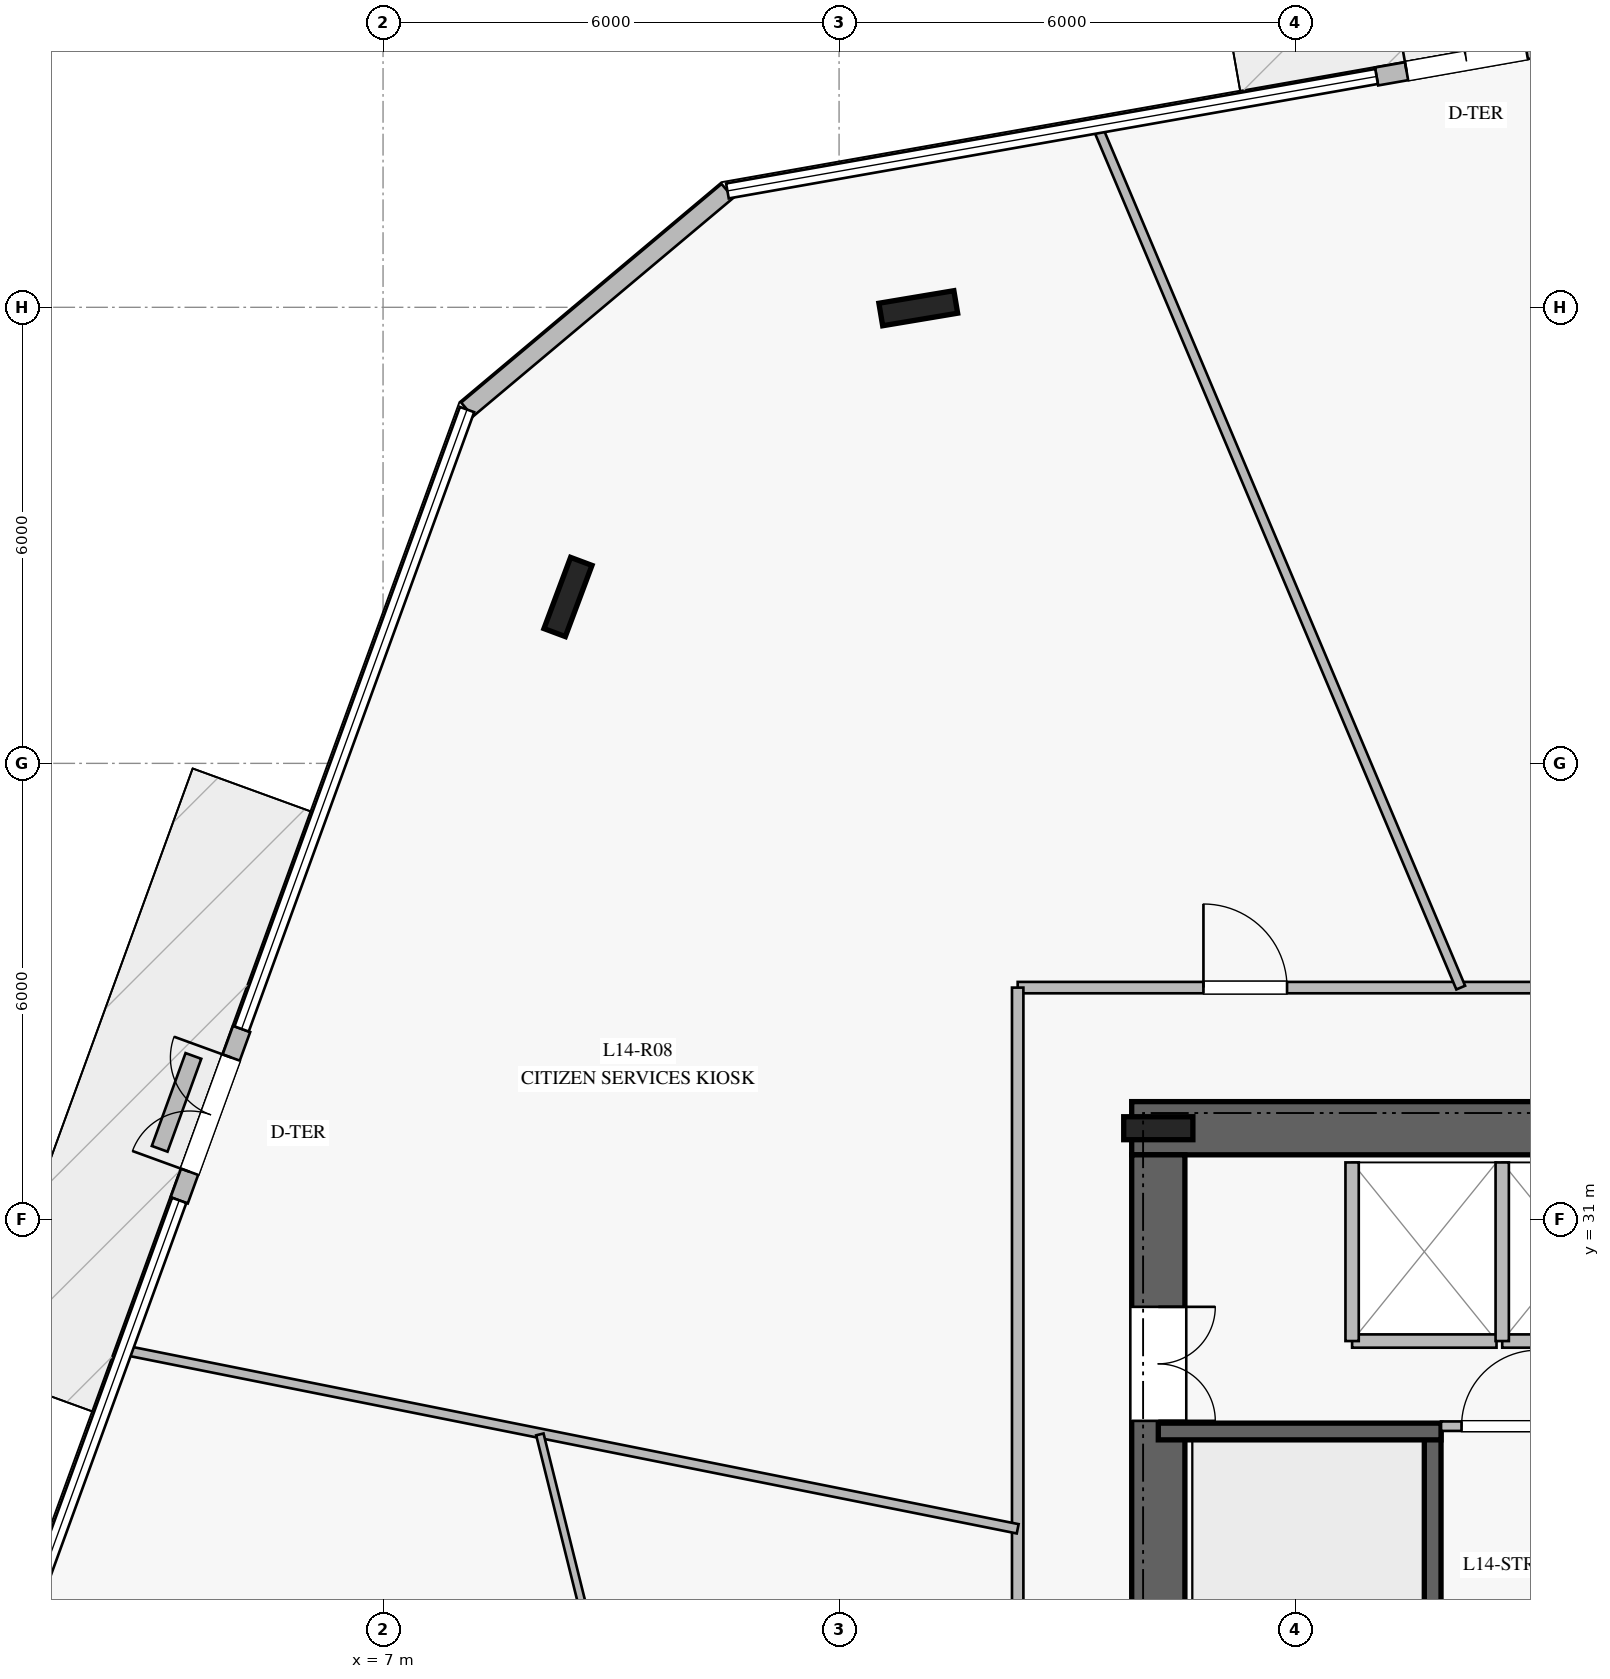
"""IFC4 building model, lengths in metres.
Left out: names, types, materials, properties, quantities, classifications, styles, units other than length and angle.
Written with IfcOpenShell. Run it as: python <this file> out.ifc"""

import sys

from ifc_helpers import new_model, si_unit, direction, frame, frame_2d, origin, origin_2d, place, context, subcontext, project, spatial, rectangle, i_section, extrude, element, fill, save


model = new_model("IFC4")
c1 = context("Model", 3, precision=1e-05, world=origin(), true_north=direction((0.0, 1.0)))
c2 = subcontext(c1, "Body", "Model", "MODEL_VIEW")
j1 = project(units=[si_unit("LENGTHUNIT", "METRE"), si_unit("PLANEANGLEUNIT", "RADIAN")], contexts=[c1])
p1 = place(None, origin())
s1 = spatial("IfcSite", under=j1, at=p1, CompositionType="ELEMENT")
p2 = place(p1, origin())
s2 = spatial("IfcBuilding", under=s1, at=p2, CompositionType="ELEMENT")
p3 = place(p2, frame((0.0, 0.0, 60.0)))
s3 = spatial("IfcBuildingStorey", under=s2, at=p3, CompositionType="ELEMENT", Elevation=60.0)
p4 = place(p3, frame((33.15, 32.2, 0.0), z_axis=(0.0, 0.0, 1.0), x_axis=(-1.0, 0.0, 0.0)))
e1 = element("IfcWall", 1, at=p4, inside=s3, PredefinedType="SHEAR", context=c2, shape_type="SweptSolid", body=[
    extrude(rectangle(XDim=16.3, YDim=0.7, at=frame_2d((8.15, 0.0))), origin(), (0.0, 0.0, 1.0), 3.76),
])
p5 = place(p4, frame((5.1, 0.0, 0.0)))
e2 = element("IfcOpeningElement", 2, at=p5, cuts=e1, PredefinedType="OPENING", context=c2, shape_type="SweptSolid", body=[
    extrude(rectangle(XDim=1.2, YDim=2.25, at=frame_2d((0.6, 1.125))), frame((0.0, 0.36, 0.0), z_axis=(0.0, -1.0, 0.0), x_axis=(1.0, 0.0, 0.0)), (0.0, 0.0, 1.0), 0.72),
])
p6 = place(p3, frame((17.2, 31.85, 0.0), z_axis=(0.0, 0.0, 1.0), x_axis=(0.0, -1.0, 0.0)))
e3 = element("IfcWall", 3, at=p6, inside=s3, PredefinedType="SHEAR", context=c2, shape_type="SweptSolid", body=[
    extrude(rectangle(XDim=13.7, YDim=0.7, at=frame_2d((6.85, 0.0))), origin(), (0.0, 0.0, 1.0), 3.76),
])
p7 = place(p6, frame((2.0, 0.0, 0.0)))
e4 = element("IfcOpeningElement", 4, at=p7, cuts=e3, PredefinedType="OPENING", context=c2, shape_type="SweptSolid", body=[
    extrude(rectangle(XDim=1.5, YDim=2.2, at=frame_2d((0.75, 1.1))), frame((0.0, 0.36, 0.0), z_axis=(0.0, -1.0, 0.0), x_axis=(1.0, 0.0, 0.0)), (0.0, 0.0, 1.0), 0.72),
])
p8 = place(p3, frame((17.2, 32.2, 0.0), z_axis=(0.0, 0.0, 1.0), x_axis=(1.0, 0.0, 0.0)))
e5 = element("IfcColumn", 5, at=p8, inside=s3, PredefinedType="COLUMN", context=c2, shape_type="SweptSolid", body=[
    extrude(i_section(OverallWidth=0.302, OverallDepth=0.91, WebThickness=0.021, FlangeThickness=0.04, at=origin_2d()), origin(), (0.0, 0.0, 1.0), 4.0),
])
p9 = place(p3, frame((20.81, 20.99, 0.0), z_axis=(0.0, 0.0, 1.0), x_axis=(0.0, 1.0, 0.0)))
e6 = element("IfcWall", 6, at=p9, inside=s3, PredefinedType="SOLIDWALL", context=c2, shape_type="SweptSolid", body=[
    extrude(rectangle(XDim=7.22, YDim=0.22, at=frame_2d((3.61, 0.0))), origin(), (0.0, 0.0, 1.0), 3.76),
])
p10 = place(p9, frame((0.18, 0.0, 0.0)))
e7 = element("IfcOpeningElement", 7, at=p10, cuts=e6, PredefinedType="OPENING", context=c2, shape_type="SweptSolid", body=[
    extrude(rectangle(XDim=1.15, YDim=2.2, at=frame_2d((0.575, 1.1))), frame((0.0, 0.12, 0.0), z_axis=(0.0, -1.0, 0.0), x_axis=(1.0, 0.0, 0.0)), (0.0, 0.0, 1.0), 0.24),
])
p11 = place(p3, frame((17.2, 28.21, 0.0), z_axis=(0.0, 0.0, 1.0), x_axis=(1.0, 0.0, 0.0)))
e8 = element("IfcWall", 8, at=p11, inside=s3, PredefinedType="SOLIDWALL", context=c2, shape_type="SweptSolid", body=[
    extrude(rectangle(XDim=3.72, YDim=0.22, at=frame_2d((1.86, 0.0))), origin(), (0.0, 0.0, 1.0), 3.76),
])
for number, where, z_axis, x_axis in (
    (9, (14.042, 42.988, 0.0), (0.0, 0.0, 1.0), (0.986, 0.165, 0.0)),
    (10, (9.433, 39.189, 0.0), (0.0, 0.0, 1.0), (0.35, 0.937, 0.0)),
):
    element("IfcColumn", number, at=place(p3, frame(where, z_axis=z_axis, x_axis=x_axis)), inside=s3, PredefinedType="COLUMN", context=c2, shape_type="SweptSolid", body=[
        extrude(i_section(OverallWidth=0.3, OverallDepth=1.0, WebThickness=0.019, FlangeThickness=0.036, at=origin_2d()), origin(), (0.0, 0.0, 1.0), 4.0),
    ])
p12 = place(p3, frame((22.436, 46.454, 0.0), z_axis=(0.0, 0.0, 1.0), x_axis=(-0.984796866145, -0.173709908848, 0.0)))
e11 = element("IfcWall", 11, at=p12, inside=s3, PredefinedType="STANDARD", context=c2, shape_type="SweptSolid", body=[
    extrude(rectangle(XDim=2.4, YDim=0.24, at=frame_2d((1.2, 0.0))), origin(), (0.0, 0.0, 1.0), 3.76),
])
p13 = place(p12, frame((0.4, 0.0, 0.0)))
e12 = element("IfcOpeningElement", 12, at=p13, cuts=e11, PredefinedType="OPENING", context=c2, shape_type="SweptSolid", body=[
    extrude(rectangle(XDim=1.6, YDim=2.25, at=frame_2d((0.8, 1.125))), frame((0.0, 0.13, 0.0), z_axis=(0.0, -1.0, 0.0), x_axis=(1.0, 0.0, 0.0)), (0.0, 0.0, 1.0), 0.26),
])
p14 = place(p3, frame((11.531, 44.531, 0.0), z_axis=(0.0, 0.0, 1.0), x_axis=(-0.765912339195, -0.642945012166, 0.0)))
e13 = element("IfcWall", 13, at=p14, inside=s3, PredefinedType="STANDARD", context=c2, shape_type="SweptSolid", body=[
    extrude(rectangle(XDim=4.473, YDim=0.24, at=frame_2d((2.237, 0.0))), origin(), (0.0, 0.0, 1.0), 3.76),
])
p15 = place(p3, frame((5.139, 33.506, 0.0), z_axis=(0.0, 0.0, 1.0), x_axis=(-0.342020767299, -0.939692393678, 0.0)))
e14 = element("IfcWall", 14, at=p15, inside=s3, PredefinedType="STANDARD", context=c2, shape_type="SweptSolid", body=[
    extrude(rectangle(XDim=2.4, YDim=0.24, at=frame_2d((1.2, 0.0))), origin(), (0.0, 0.0, 1.0), 3.76),
])
p16 = place(p15, frame((0.4, 0.0, 0.0)))
e15 = element("IfcOpeningElement", 15, at=p16, cuts=e14, PredefinedType="OPENING", context=c2, shape_type="SweptSolid", body=[
    extrude(rectangle(XDim=1.6, YDim=2.25, at=frame_2d((0.8, 1.125))), frame((0.0, 0.13, 0.0), z_axis=(0.0, -1.0, 0.0), x_axis=(1.0, 0.0, 0.0)), (0.0, 0.0, 1.0), 0.26),
])
p17 = place(p3, frame((4.505, 33.151, 0.0), z_axis=(0.0, 0.0, 1.0), x_axis=(-0.341411316317, -0.93991399239, 0.0)))
e16 = element("IfcWall", 16, at=p17, inside=s3, PredefinedType="USERDEFINED", context=c2, shape_type="SweptSolid", body=[
    extrude(rectangle(XDim=1.3, YDim=0.22, at=frame_2d((0.65, 0.0))), origin(), (0.0, 0.0, 1.0), 0.4),
])
p18 = place(p3, frame((20.92, 28.28, 0.0), z_axis=(0.0, 0.0, 1.0), x_axis=(1.0, 0.0, 0.0)))
e17 = element("IfcWall", 17, at=p18, inside=s3, PredefinedType="PARTITIONING", context=c2, shape_type="SweptSolid", body=[
    extrude(rectangle(XDim=3.405, YDim=0.125, at=frame_2d((1.703, 0.0))), origin(), (0.0, 0.0, 1.0), 3.76),
])
p19 = place(p18, frame((0.27, 0.0, 0.0)))
e18 = element("IfcOpeningElement", 18, at=p19, cuts=e17, PredefinedType="OPENING", context=c2, shape_type="SweptSolid", body=[
    extrude(rectangle(XDim=1.0, YDim=2.15, at=frame_2d((0.5, 1.075))), frame((0.0, 0.073, 0.0), z_axis=(0.0, -1.0, 0.0), x_axis=(1.0, 0.0, 0.0)), (0.0, 0.0, 1.0), 0.145),
])
p20 = place(p3, frame((19.75, 29.4, 0.0), z_axis=(0.0, 0.0, 1.0), x_axis=(1.0, 0.0, 0.0)))
e19 = element("IfcWall", 19, at=p20, inside=s3, PredefinedType="PARTITIONING", context=c2, shape_type="SweptSolid", body=[
    extrude(rectangle(XDim=1.9, YDim=0.175, at=frame_2d((0.95, 0.0))), origin(), (0.0, 0.0, 1.0), 3.76),
])
p21 = place(p3, frame((19.75, 29.4, 0.0), z_axis=(0.0, 0.0, 1.0), x_axis=(0.0, 1.0, 0.0)))
e20 = element("IfcWall", 20, at=p21, inside=s3, PredefinedType="PARTITIONING", context=c2, shape_type="SweptSolid", body=[
    extrude(rectangle(XDim=2.35, YDim=0.175, at=frame_2d((1.175, 0.0))), origin(), (0.0, 0.0, 1.0), 3.76),
])
p22 = place(p3, frame((21.725, 29.4, 0.0), z_axis=(0.0, 0.0, 1.0), x_axis=(1.0, 0.0, 0.0)))
e21 = element("IfcWall", 21, at=p22, inside=s3, PredefinedType="PARTITIONING", context=c2, shape_type="SweptSolid", body=[
    extrude(rectangle(XDim=1.9, YDim=0.175, at=frame_2d((0.95, 0.0))), origin(), (0.0, 0.0, 1.0), 3.76),
])
p23 = place(p3, frame((21.725, 29.4, 0.0), z_axis=(0.0, 0.0, 1.0), x_axis=(0.0, 1.0, 0.0)))
e22 = element("IfcWall", 22, at=p23, inside=s3, PredefinedType="PARTITIONING", context=c2, shape_type="SweptSolid", body=[
    extrude(rectangle(XDim=2.35, YDim=0.175, at=frame_2d((1.175, 0.0))), origin(), (0.0, 0.0, 1.0), 3.76),
])
p24 = place(p3, frame((15.35, 34.05, 0.0), z_axis=(0.0, 0.0, 1.0), x_axis=(1.0, 0.0, 0.0)))
e23 = element("IfcWall", 23, at=p24, inside=s3, PredefinedType="PARTITIONING", context=c2, shape_type="SweptSolid", body=[
    extrude(rectangle(XDim=19.3, YDim=0.15, at=frame_2d((9.65, 0.0))), origin(), (0.0, 0.0, 1.0), 3.21),
])
p25 = place(p24, frame((15.91, 0.0, 0.0)))
e24 = element("IfcOpeningElement", 24, at=p25, cuts=e23, PredefinedType="OPENING", context=c2, shape_type="SweptSolid", body=[
    extrude(rectangle(XDim=1.1, YDim=2.2, at=frame_2d((0.55, 1.1))), frame((0.0, 0.085, 0.0), z_axis=(0.0, -1.0, 0.0), x_axis=(1.0, 0.0, 0.0)), (0.0, 0.0, 1.0), 0.17),
])
p26 = place(p24, frame((9.342, 0.0, 0.0)))
e25 = element("IfcOpeningElement", 25, at=p26, cuts=e23, PredefinedType="OPENING", context=c2, shape_type="SweptSolid", body=[
    extrude(rectangle(XDim=1.1, YDim=2.2, at=frame_2d((0.55, 1.1))), frame((0.0, 0.085, 0.0), z_axis=(0.0, -1.0, 0.0), x_axis=(1.0, 0.0, 0.0)), (0.0, 0.0, 1.0), 0.17),
])
p27 = place(p24, frame((2.444, 0.0, 0.0)))
e26 = element("IfcOpeningElement", 26, at=p27, cuts=e23, PredefinedType="OPENING", context=c2, shape_type="SweptSolid", body=[
    extrude(rectangle(XDim=1.1, YDim=2.2, at=frame_2d((0.55, 1.1))), frame((0.0, 0.085, 0.0), z_axis=(0.0, -1.0, 0.0), x_axis=(1.0, 0.0, 0.0)), (0.0, 0.0, 1.0), 0.17),
])
p28 = place(p3, frame((15.35, 15.95, 0.0), z_axis=(0.0, 0.0, 1.0), x_axis=(0.0, 1.0, 0.0)))
e27 = element("IfcWall", 27, at=p28, inside=s3, PredefinedType="PARTITIONING", context=c2, shape_type="SweptSolid", body=[
    extrude(rectangle(XDim=18.1, YDim=0.15, at=frame_2d((9.05, 0.0))), origin(), (0.0, 0.0, 1.0), 3.21),
])
p29 = place(p28, frame((5.296, 0.0, 0.0)))
e28 = element("IfcOpeningElement", 28, at=p29, cuts=e27, PredefinedType="OPENING", context=c2, shape_type="SweptSolid", body=[
    extrude(rectangle(XDim=1.1, YDim=2.2, at=frame_2d((0.55, 1.1))), frame((0.0, 0.085, 0.0), z_axis=(0.0, -1.0, 0.0), x_axis=(1.0, 0.0, 0.0)), (0.0, 0.0, 1.0), 0.17),
])
p30 = place(p3, frame((21.179, 34.05, 0.0), z_axis=(0.0, 0.0, 1.0), x_axis=(-0.388906837938, 0.921277087203, 0.0)))
e29 = element("IfcWall", 29, at=p30, inside=s3, PredefinedType="PARTITIONING", context=c2, shape_type="SweptSolid", body=[
    extrude(rectangle(XDim=12.288, YDim=0.125, at=frame_2d((6.144, 0.0))), origin(), (0.0, 0.0, 1.0), 3.06),
])
p31 = place(p3, frame((15.35, 26.93, 0.0), z_axis=(0.0, 0.0, 1.0), x_axis=(-0.980588523193, 0.196076893546, 0.0)))
e30 = element("IfcWall", 30, at=p31, inside=s3, PredefinedType="PARTITIONING", context=c2, shape_type="SweptSolid", body=[
    extrude(rectangle(XDim=11.964, YDim=0.125, at=frame_2d((5.982, 0.0))), origin(), (0.0, 0.0, 1.0), 3.05),
])
p32 = place(p3, frame((9.063, 28.172, 0.0), z_axis=(0.0, 0.0, 1.0), x_axis=(0.241406037558, -0.970424198498, 0.0)))
e31 = element("IfcWall", 31, at=p32, inside=s3, PredefinedType="MOVABLE", context=c2, shape_type="SweptSolid", body=[
    extrude(rectangle(XDim=14.089, YDim=0.1, at=frame_2d((7.044, 0.0))), origin(), (0.0, 0.0, 1.0), 3.05),
])
p33 = place(p32, frame((6.454, 0.0, 0.0)))
e32 = element("IfcOpeningElement", 32, at=p33, cuts=e31, PredefinedType="OPENING", context=c2, shape_type="SweptSolid", body=[
    extrude(rectangle(XDim=1.0, YDim=2.15, at=frame_2d((0.5, 1.075))), frame((0.0, 0.06, 0.0), z_axis=(0.0, -1.0, 0.0), x_axis=(1.0, 0.0, 0.0)), (0.0, 0.0, 1.0), 0.12),
])
p34 = place(p13, frame((1.6, 0.0, 0.0), z_axis=(0.0, 0.0, 1.0), x_axis=(-1.0, 0.0, 0.0)))
e33 = element("IfcDoor", 33, at=p34, inside=s3, OperationType="DOUBLE_DOOR_SINGLE_SWING", PredefinedType="DOOR", context=c2, shape_type="SweptSolid", body=[
    extrude(rectangle(XDim=1.6, YDim=2.25, at=frame_2d((0.8, 1.125))), frame((0.0, 0.025, 0.0), z_axis=(0.0, -1.0, 0.0), x_axis=(1.0, 0.0, 0.0)), (0.0, 0.0, 1.0), 0.05),
])
fill(e12, e33)
p35 = place(p16, frame((1.6, 0.0, 0.0), z_axis=(0.0, 0.0, 1.0), x_axis=(-1.0, 0.0, 0.0)))
e34 = element("IfcDoor", 34, at=p35, inside=s3, OperationType="DOUBLE_DOOR_SINGLE_SWING", PredefinedType="DOOR", context=c2, shape_type="SweptSolid", body=[
    extrude(rectangle(XDim=1.6, YDim=2.25, at=frame_2d((0.8, 1.125))), frame((0.0, 0.025, 0.0), z_axis=(0.0, -1.0, 0.0), x_axis=(1.0, 0.0, 0.0)), (0.0, 0.0, 1.0), 0.05),
])
fill(e15, e34)
p36 = place(p7, origin())
e35 = element("IfcDoor", 35, at=p36, inside=s3, OperationType="DOUBLE_DOOR_SINGLE_SWING", PredefinedType="DOOR", context=c2, shape_type="SweptSolid", body=[
    extrude(rectangle(XDim=1.5, YDim=2.2, at=frame_2d((0.75, 1.1))), frame((0.0, 0.025, 0.0), z_axis=(0.0, -1.0, 0.0), x_axis=(1.0, 0.0, 0.0)), (0.0, 0.0, 1.0), 0.05),
])
fill(e4, e35)
p37 = place(p19, origin())
e36 = element("IfcDoor", 36, at=p37, inside=s3, OperationType="SINGLE_SWING_RIGHT", PredefinedType="DOOR", context=c2, shape_type="SweptSolid", body=[
    extrude(rectangle(XDim=1.0, YDim=2.15, at=frame_2d((0.5, 1.075))), frame((0.0, 0.025, 0.0), z_axis=(0.0, -1.0, 0.0), x_axis=(1.0, 0.0, 0.0)), (0.0, 0.0, 1.0), 0.05),
])
fill(e18, e36)
p38 = place(p27, origin())
e37 = element("IfcDoor", 37, at=p38, inside=s3, OperationType="SINGLE_SWING_LEFT", PredefinedType="DOOR", context=c2, shape_type="SweptSolid", body=[
    extrude(rectangle(XDim=1.1, YDim=2.2, at=frame_2d((0.55, 1.1))), frame((0.0, 0.025, 0.0), z_axis=(0.0, -1.0, 0.0), x_axis=(1.0, 0.0, 0.0)), (0.0, 0.0, 1.0), 0.05),
])
fill(e26, e37)
save(model, sys.argv[1])
